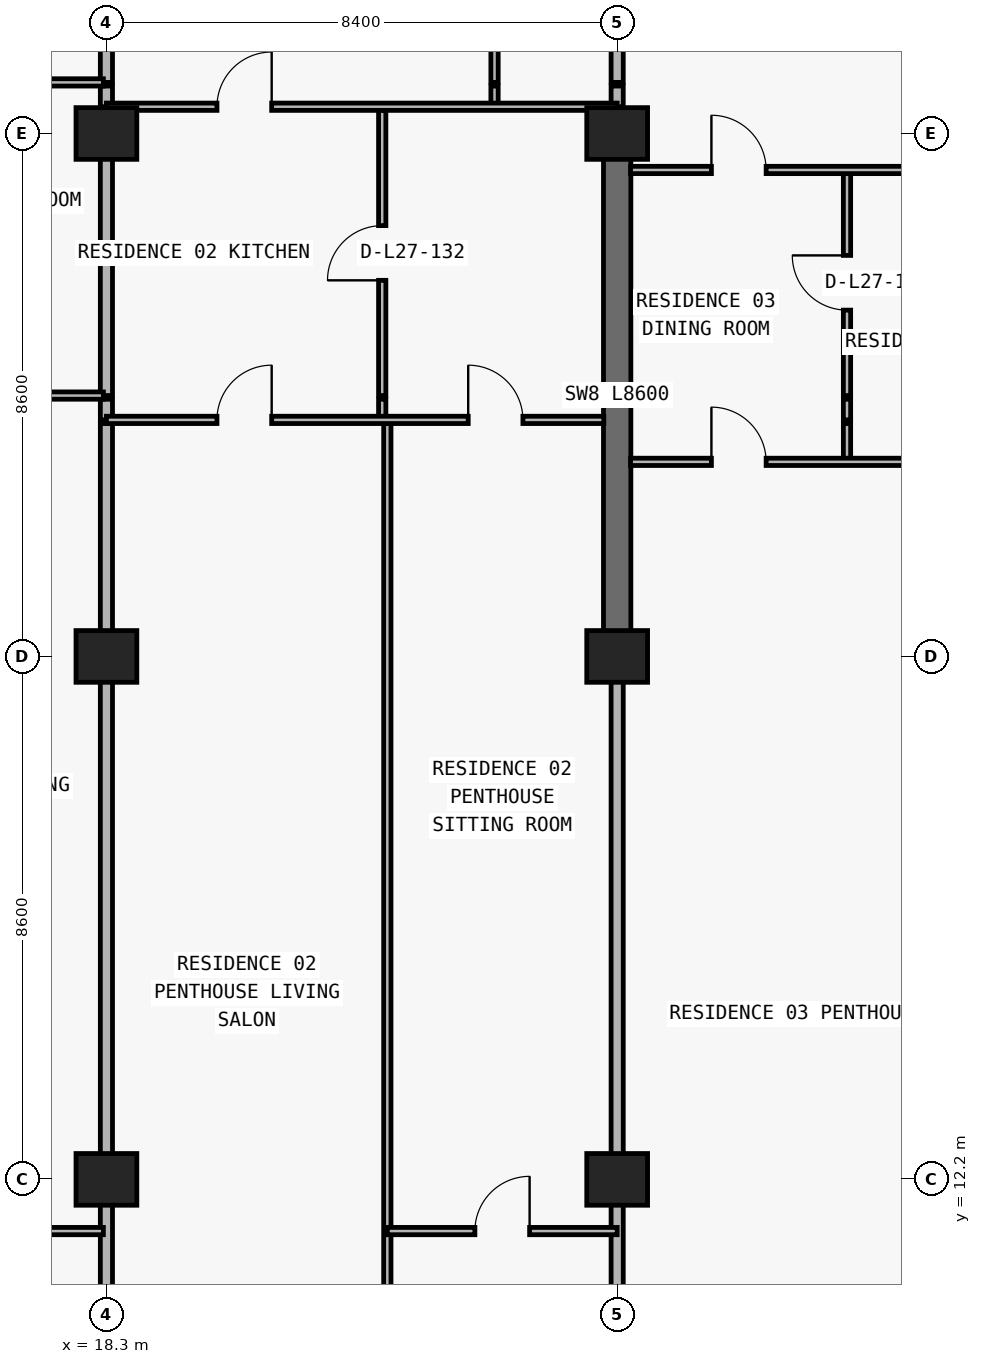
"""IFC4 building model, lengths in metres.
Left out: names, types, materials, properties, quantities, classifications, styles, units other than length and angle.
Written with IfcOpenShell. Run it as: python <this file> out.ifc"""

import sys

from ifc_helpers import new_model, si_unit, direction, frame, frame_2d, origin, origin_2d, place, context, subcontext, project, spatial, rectangle, extrude, element, fill, save


model = new_model("IFC4")
c1 = context("Model", 3, precision=1e-05, world=origin(), true_north=direction((0.0, 1.0)))
c2 = subcontext(c1, "Body", "Model", "MODEL_VIEW")
j1 = project(units=[si_unit("LENGTHUNIT", "METRE"), si_unit("PLANEANGLEUNIT", "RADIAN")], contexts=[c1])
p1 = place(None, origin())
s1 = spatial("IfcSite", under=j1, at=p1, CompositionType="ELEMENT")
p2 = place(p1, origin())
s2 = spatial("IfcBuilding", under=s1, at=p2, CompositionType="ELEMENT")
p3 = place(p2, frame((0.0, 0.0, 102.6)))
s3 = spatial("IfcBuildingStorey", under=s2, at=p3, CompositionType="ELEMENT", Elevation=102.6)
for number, where, z_axis, x_axis in (
    (1, (18.3, 12.2, 0.0), (0.0, 0.0, 1.0), (1.0, 0.0, 0.0)),
    (2, (26.7, 12.2, 0.0), (0.0, 0.0, 1.0), (1.0, 0.0, 0.0)),
    (3, (18.3, 20.8, 0.0), (0.0, 0.0, 1.0), (1.0, 0.0, 0.0)),
    (4, (26.7, 20.8, 0.0), (0.0, 0.0, 1.0), (1.0, 0.0, 0.0)),
    (5, (18.3, 29.4, 0.0), (0.0, 0.0, 1.0), (1.0, 0.0, 0.0)),
    (6, (26.7, 29.4, 0.0), (0.0, 0.0, 1.0), (1.0, 0.0, 0.0)),
):
    element("IfcColumn", number, at=place(p3, frame(where, z_axis=z_axis, x_axis=x_axis)), inside=s3, PredefinedType="COLUMN", context=c2, shape_type="SweptSolid", body=[
        extrude(rectangle(XDim=1.0, YDim=0.85, at=origin_2d()), origin(), (0.0, 0.0, 1.0), 3.05),
    ])
p4 = place(p3, frame((26.7, 20.8, 0.0), z_axis=(0.0, 0.0, 1.0), x_axis=(0.0, 1.0, 0.0)))
e7 = element("IfcWall", 7, at=p4, inside=s3, PredefinedType="SHEAR", context=c2, shape_type="SweptSolid", body=[
    extrude(rectangle(XDim=8.6, YDim=0.45, at=frame_2d((4.3, 0.0))), origin(), (0.0, 0.0, 1.0), 3.05),
])
p5 = place(p3, frame((18.3, 8.84, 0.0), z_axis=(0.0, 0.0, 1.0), x_axis=(0.0, 1.0, 0.0)))
e8 = element("IfcWall", 8, at=p5, inside=s3, PredefinedType="PARTITIONING", context=c2, shape_type="SweptSolid", body=[
    extrude(rectangle(XDim=15.79, YDim=0.2, at=frame_2d((7.895, 0.0))), origin(), (0.0, 0.0, 1.0), 2.174),
])
p6 = place(p3, frame((18.3, 24.69, 0.0), z_axis=(0.0, 0.0, 1.0), x_axis=(0.0, 1.0, 0.0)))
e9 = element("IfcWall", 9, at=p6, inside=s3, PredefinedType="PARTITIONING", context=c2, shape_type="SweptSolid", body=[
    extrude(rectangle(XDim=0.34, YDim=0.2, at=frame_2d((0.17, 0.0))), origin(), (0.0, 0.0, 1.0), 2.174),
])
p7 = place(p3, frame((18.3, 25.09, 0.0), z_axis=(0.0, 0.0, 1.0), x_axis=(0.0, 1.0, 0.0)))
e10 = element("IfcWall", 10, at=p7, inside=s3, PredefinedType="PARTITIONING", context=c2, shape_type="SweptSolid", body=[
    extrude(rectangle(XDim=4.69, YDim=0.2, at=frame_2d((2.345, 0.0))), origin(), (0.0, 0.0, 1.0), 2.174),
])
p8 = place(p3, frame((18.3, 29.84, 0.0), z_axis=(0.0, 0.0, 1.0), x_axis=(0.0, 1.0, 0.0)))
e11 = element("IfcWall", 11, at=p8, inside=s3, PredefinedType="PARTITIONING", context=c2, shape_type="SweptSolid", body=[
    extrude(rectangle(XDim=0.34, YDim=0.2, at=frame_2d((0.17, 0.0))), origin(), (0.0, 0.0, 1.0), 2.174),
])
p9 = place(p3, frame((18.3, 30.24, 0.0), z_axis=(0.0, 0.0, 1.0), x_axis=(0.0, 1.0, 0.0)))
e12 = element("IfcWall", 12, at=p9, inside=s3, PredefinedType="PARTITIONING", context=c2, shape_type="SweptSolid", body=[
    extrude(rectangle(XDim=4.36, YDim=0.2, at=frame_2d((2.18, 0.0))), origin(), (0.0, 0.0, 1.0), 2.174),
])
p10 = place(p3, frame((22.836, 24.69, 0.0), z_axis=(0.0, 0.0, 1.0), x_axis=(0.0, 1.0, 0.0)))
e13 = element("IfcWall", 13, at=p10, inside=s3, PredefinedType="PARTITIONING", context=c2, shape_type="SweptSolid", body=[
    extrude(rectangle(XDim=0.34, YDim=0.12, at=frame_2d((0.17, 0.0))), origin(), (0.0, 0.0, 1.0), 3.05),
])
p11 = place(p3, frame((22.836, 25.09, 0.0), z_axis=(0.0, 0.0, 1.0), x_axis=(0.0, 1.0, 0.0)))
e14 = element("IfcWall", 14, at=p11, inside=s3, PredefinedType="PARTITIONING", context=c2, shape_type="SweptSolid", body=[
    extrude(rectangle(XDim=4.69, YDim=0.12, at=frame_2d((2.345, 0.0))), origin(), (0.0, 0.0, 1.0), 3.05),
])
p12 = place(p11, frame((1.895, 0.0, 0.0)))
e15 = element("IfcOpeningElement", 15, at=p12, cuts=e14, PredefinedType="OPENING", context=c2, shape_type="SweptSolid", body=[
    extrude(rectangle(XDim=0.9, YDim=2.15, at=frame_2d((0.45, 1.075))), frame((0.0, 0.07, 0.0), z_axis=(0.0, -1.0, 0.0), x_axis=(1.0, 0.0, 0.0)), (0.0, 0.0, 1.0), 0.14),
])
p13 = place(p3, frame((22.92, 8.84, 0.0), z_axis=(0.0, 0.0, 1.0), x_axis=(0.0, 1.0, 0.0)))
e16 = element("IfcWall", 16, at=p13, inside=s3, PredefinedType="PARTITIONING", context=c2, shape_type="SweptSolid", body=[
    extrude(rectangle(XDim=15.79, YDim=0.12, at=frame_2d((7.895, 0.0))), origin(), (0.0, 0.0, 1.0), 3.05),
])
p14 = place(p3, frame((24.683, 29.84, 0.0), z_axis=(0.0, 0.0, 1.0), x_axis=(0.0, 1.0, 0.0)))
e17 = element("IfcWall", 17, at=p14, inside=s3, PredefinedType="PARTITIONING", context=c2, shape_type="SweptSolid", body=[
    extrude(rectangle(XDim=0.34, YDim=0.12, at=frame_2d((0.17, 0.0))), origin(), (0.0, 0.0, 1.0), 3.05),
])
p15 = place(p3, frame((24.683, 30.24, 0.0), z_axis=(0.0, 0.0, 1.0), x_axis=(0.0, 1.0, 0.0)))
e18 = element("IfcWall", 18, at=p15, inside=s3, PredefinedType="PARTITIONING", context=c2, shape_type="SweptSolid", body=[
    extrude(rectangle(XDim=4.36, YDim=0.12, at=frame_2d((2.18, 0.0))), origin(), (0.0, 0.0, 1.0), 3.05),
])
p16 = place(p15, frame((1.755, 0.0, 0.0)))
e19 = element("IfcOpeningElement", 19, at=p16, cuts=e18, PredefinedType="OPENING", context=c2, shape_type="SweptSolid", body=[
    extrude(rectangle(XDim=0.85, YDim=2.1, at=frame_2d((0.425, 1.05))), frame((0.0, 0.07, 0.0), z_axis=(0.0, -1.0, 0.0), x_axis=(1.0, 0.0, 0.0)), (0.0, 0.0, 1.0), 0.14),
])
p17 = place(p3, frame((26.7, 8.84, 0.0), z_axis=(0.0, 0.0, 1.0), x_axis=(0.0, 1.0, 0.0)))
e20 = element("IfcWall", 20, at=p17, inside=s3, PredefinedType="PARTITIONING", context=c2, shape_type="SweptSolid", body=[
    extrude(rectangle(XDim=11.955, YDim=0.2, at=frame_2d((5.978, 0.0))), origin(), (0.0, 0.0, 1.0), 2.174),
])
p18 = place(p3, frame((26.7, 29.405, 0.0), z_axis=(0.0, 0.0, 1.0), x_axis=(0.0, 1.0, 0.0)))
e21 = element("IfcWall", 21, at=p18, inside=s3, PredefinedType="PARTITIONING", context=c2, shape_type="SweptSolid", body=[
    extrude(rectangle(XDim=0.375, YDim=0.2, at=frame_2d((0.188, 0.0))), origin(), (0.0, 0.0, 1.0), 3.05),
])
p19 = place(p3, frame((26.7, 29.84, 0.0), z_axis=(0.0, 0.0, 1.0), x_axis=(0.0, 1.0, 0.0)))
e22 = element("IfcWall", 22, at=p19, inside=s3, PredefinedType="PARTITIONING", context=c2, shape_type="SweptSolid", body=[
    extrude(rectangle(XDim=0.34, YDim=0.2, at=frame_2d((0.17, 0.0))), origin(), (0.0, 0.0, 1.0), 2.335),
])
p20 = place(p3, frame((26.7, 30.24, 0.0), z_axis=(0.0, 0.0, 1.0), x_axis=(0.0, 1.0, 0.0)))
e23 = element("IfcWall", 23, at=p20, inside=s3, PredefinedType="PARTITIONING", context=c2, shape_type="SweptSolid", body=[
    extrude(rectangle(XDim=4.36, YDim=0.2, at=frame_2d((2.18, 0.0))), origin(), (0.0, 0.0, 1.0), 2.335),
])
p21 = place(p3, frame((30.48, 24.0, 0.0), z_axis=(0.0, 0.0, 1.0), x_axis=(0.0, 1.0, 0.0)))
e24 = element("IfcWall", 24, at=p21, inside=s3, PredefinedType="PARTITIONING", context=c2, shape_type="SweptSolid", body=[
    extrude(rectangle(XDim=0.63, YDim=0.12, at=frame_2d((0.315, 0.0))), origin(), (0.0, 0.0, 1.0), 3.05),
])
p22 = place(p3, frame((30.48, 24.69, 0.0), z_axis=(0.0, 0.0, 1.0), x_axis=(0.0, 1.0, 0.0)))
e25 = element("IfcWall", 25, at=p22, inside=s3, PredefinedType="PARTITIONING", context=c2, shape_type="SweptSolid", body=[
    extrude(rectangle(XDim=0.34, YDim=0.12, at=frame_2d((0.17, 0.0))), origin(), (0.0, 0.0, 1.0), 3.05),
])
p23 = place(p3, frame((30.48, 25.09, 0.0), z_axis=(0.0, 0.0, 1.0), x_axis=(0.0, 1.0, 0.0)))
e26 = element("IfcWall", 26, at=p23, inside=s3, PredefinedType="PARTITIONING", context=c2, shape_type="SweptSolid", body=[
    extrude(rectangle(XDim=3.71, YDim=0.12, at=frame_2d((1.855, 0.0))), origin(), (0.0, 0.0, 1.0), 3.05),
])
p24 = place(p23, frame((1.405, 0.0, 0.0)))
e27 = element("IfcOpeningElement", 27, at=p24, cuts=e26, PredefinedType="OPENING", context=c2, shape_type="SweptSolid", body=[
    extrude(rectangle(XDim=0.9, YDim=2.15, at=frame_2d((0.45, 1.075))), frame((0.0, 0.07, 0.0), z_axis=(0.0, -1.0, 0.0), x_axis=(1.0, 0.0, 0.0)), (0.0, 0.0, 1.0), 0.14),
])
p25 = place(p3, frame((13.848, 11.35, 0.0), z_axis=(0.0, 0.0, 1.0), x_axis=(1.0, 0.0, 0.0)))
e28 = element("IfcWall", 28, at=p25, inside=s3, PredefinedType="PARTITIONING", context=c2, shape_type="SweptSolid", body=[
    extrude(rectangle(XDim=4.402, YDim=0.12, at=frame_2d((2.201, 0.0))), origin(), (0.0, 0.0, 1.0), 3.05),
])
p26 = place(p25, frame((1.751, 0.0, 0.0)))
e29 = element("IfcOpeningElement", 29, at=p26, cuts=e28, PredefinedType="OPENING", context=c2, shape_type="SweptSolid", body=[
    extrude(rectangle(XDim=0.9, YDim=2.15, at=frame_2d((0.45, 1.075))), frame((0.0, 0.07, 0.0), z_axis=(0.0, -1.0, 0.0), x_axis=(1.0, 0.0, 0.0)), (0.0, 0.0, 1.0), 0.14),
])
p27 = place(p3, frame((22.92, 11.35, 0.0), z_axis=(0.0, 0.0, 1.0), x_axis=(1.0, 0.0, 0.0)))
e30 = element("IfcWall", 30, at=p27, inside=s3, PredefinedType="PARTITIONING", context=c2, shape_type="SweptSolid", body=[
    extrude(rectangle(XDim=3.78, YDim=0.12, at=frame_2d((1.89, 0.0))), origin(), (0.0, 0.0, 1.0), 3.05),
])
p28 = place(p27, frame((1.44, 0.0, 0.0)))
e31 = element("IfcOpeningElement", 31, at=p28, cuts=e30, PredefinedType="OPENING", context=c2, shape_type="SweptSolid", body=[
    extrude(rectangle(XDim=0.9, YDim=2.15, at=frame_2d((0.45, 1.075))), frame((0.0, 0.07, 0.0), z_axis=(0.0, -1.0, 0.0), x_axis=(1.0, 0.0, 0.0)), (0.0, 0.0, 1.0), 0.14),
])
p29 = place(p3, frame((26.92, 24.0, 0.0), z_axis=(0.0, 0.0, 1.0), x_axis=(1.0, 0.0, 0.0)))
e32 = element("IfcWall", 32, at=p29, inside=s3, PredefinedType="PARTITIONING", context=c2, shape_type="SweptSolid", body=[
    extrude(rectangle(XDim=8.18, YDim=0.12, at=frame_2d((4.09, 0.0))), origin(), (0.0, 0.0, 1.0), 3.05),
])
p30 = place(p29, frame((1.33, 0.0, 0.0)))
e33 = element("IfcOpeningElement", 33, at=p30, cuts=e32, PredefinedType="OPENING", context=c2, shape_type="SweptSolid", body=[
    extrude(rectangle(XDim=0.9, YDim=2.15, at=frame_2d((0.45, 1.075))), frame((0.0, 0.07, 0.0), z_axis=(0.0, -1.0, 0.0), x_axis=(1.0, 0.0, 0.0)), (0.0, 0.0, 1.0), 0.14),
])
p31 = place(p3, frame((18.3, 24.69, 0.0), z_axis=(0.0, 0.0, 1.0), x_axis=(1.0, 0.0, 0.0)))
e34 = element("IfcWall", 34, at=p31, inside=s3, PredefinedType="PARTITIONING", context=c2, shape_type="SweptSolid", body=[
    extrude(rectangle(XDim=8.18, YDim=0.12, at=frame_2d((4.09, 0.0))), origin(), (0.0, 0.0, 1.0), 3.05),
])
p32 = place(p31, frame((1.818, 0.0, 0.0)))
e35 = element("IfcOpeningElement", 35, at=p32, cuts=e34, PredefinedType="OPENING", context=c2, shape_type="SweptSolid", body=[
    extrude(rectangle(XDim=0.9, YDim=2.15, at=frame_2d((0.45, 1.075))), frame((0.0, 0.07, 0.0), z_axis=(0.0, -1.0, 0.0), x_axis=(1.0, 0.0, 0.0)), (0.0, 0.0, 1.0), 0.14),
])
p33 = place(p31, frame((5.95, 0.0, 0.0)))
e36 = element("IfcOpeningElement", 36, at=p33, cuts=e34, PredefinedType="OPENING", context=c2, shape_type="SweptSolid", body=[
    extrude(rectangle(XDim=0.9, YDim=2.15, at=frame_2d((0.45, 1.075))), frame((0.0, 0.07, 0.0), z_axis=(0.0, -1.0, 0.0), x_axis=(1.0, 0.0, 0.0)), (0.0, 0.0, 1.0), 0.14),
])
p34 = place(p3, frame((9.9, 25.09, 0.0), z_axis=(0.0, 0.0, 1.0), x_axis=(1.0, 0.0, 0.0)))
e37 = element("IfcWall", 37, at=p34, inside=s3, PredefinedType="PARTITIONING", context=c2, shape_type="SweptSolid", body=[
    extrude(rectangle(XDim=8.35, YDim=0.12, at=frame_2d((4.175, 0.0))), origin(), (0.0, 0.0, 1.0), 3.05),
])
p35 = place(p34, frame((1.524, 0.0, 0.0)))
e38 = element("IfcOpeningElement", 38, at=p35, cuts=e37, PredefinedType="OPENING", context=c2, shape_type="SweptSolid", body=[
    extrude(rectangle(XDim=0.9, YDim=2.15, at=frame_2d((0.45, 1.075))), frame((0.0, 0.07, 0.0), z_axis=(0.0, -1.0, 0.0), x_axis=(1.0, 0.0, 0.0)), (0.0, 0.0, 1.0), 0.14),
])
p36 = place(p34, frame((5.868, 0.0, 0.0)))
e39 = element("IfcOpeningElement", 39, at=p36, cuts=e37, PredefinedType="OPENING", context=c2, shape_type="SweptSolid", body=[
    extrude(rectangle(XDim=0.9, YDim=2.15, at=frame_2d((0.45, 1.075))), frame((0.0, 0.07, 0.0), z_axis=(0.0, -1.0, 0.0), x_axis=(1.0, 0.0, 0.0)), (0.0, 0.0, 1.0), 0.14),
])
p37 = place(p3, frame((26.92, 28.8, 0.0), z_axis=(0.0, 0.0, 1.0), x_axis=(1.0, 0.0, 0.0)))
e40 = element("IfcWall", 40, at=p37, inside=s3, PredefinedType="PARTITIONING", context=c2, shape_type="SweptSolid", body=[
    extrude(rectangle(XDim=8.175, YDim=0.12, at=frame_2d((4.087, 0.0))), origin(), (0.0, 0.0, 1.0), 3.05),
])
p38 = place(p37, frame((1.33, 0.0, 0.0)))
e41 = element("IfcOpeningElement", 41, at=p38, cuts=e40, PredefinedType="OPENING", context=c2, shape_type="SweptSolid", body=[
    extrude(rectangle(XDim=0.9, YDim=2.15, at=frame_2d((0.45, 1.075))), frame((0.0, 0.07, 0.0), z_axis=(0.0, -1.0, 0.0), x_axis=(1.0, 0.0, 0.0)), (0.0, 0.0, 1.0), 0.14),
])
p39 = place(p3, frame((18.3, 29.84, 0.0), z_axis=(0.0, 0.0, 1.0), x_axis=(1.0, 0.0, 0.0)))
e42 = element("IfcWall", 42, at=p39, inside=s3, PredefinedType="PARTITIONING", context=c2, shape_type="SweptSolid", body=[
    extrude(rectangle(XDim=8.4, YDim=0.12, at=frame_2d((4.2, 0.0))), origin(), (0.0, 0.0, 1.0), 3.05),
])
p40 = place(p39, frame((1.818, 0.0, 0.0)))
e43 = element("IfcOpeningElement", 43, at=p40, cuts=e42, PredefinedType="OPENING", context=c2, shape_type="SweptSolid", body=[
    extrude(rectangle(XDim=0.9, YDim=2.15, at=frame_2d((0.45, 1.075))), frame((0.0, 0.07, 0.0), z_axis=(0.0, -1.0, 0.0), x_axis=(1.0, 0.0, 0.0)), (0.0, 0.0, 1.0), 0.14),
])
p41 = place(p3, frame((9.9, 30.24, 0.0), z_axis=(0.0, 0.0, 1.0), x_axis=(1.0, 0.0, 0.0)))
e44 = element("IfcWall", 44, at=p41, inside=s3, PredefinedType="PARTITIONING", context=c2, shape_type="SweptSolid", body=[
    extrude(rectangle(XDim=8.35, YDim=0.12, at=frame_2d((4.175, 0.0))), origin(), (0.0, 0.0, 1.0), 3.05),
])
p42 = place(p41, frame((1.693, 0.0, 0.0)))
e45 = element("IfcOpeningElement", 45, at=p42, cuts=e44, PredefinedType="OPENING", context=c2, shape_type="SweptSolid", body=[
    extrude(rectangle(XDim=0.9, YDim=2.15, at=frame_2d((0.45, 1.075))), frame((0.0, 0.07, 0.0), z_axis=(0.0, -1.0, 0.0), x_axis=(1.0, 0.0, 0.0)), (0.0, 0.0, 1.0), 0.14),
])
p43 = place(p40, origin())
e46 = element("IfcDoor", 46, at=p43, inside=s3, OperationType="SINGLE_SWING_RIGHT", PredefinedType="DOOR", context=c2, shape_type="SweptSolid", body=[
    extrude(rectangle(XDim=0.9, YDim=2.15, at=frame_2d((0.45, 1.075))), frame((0.0, 0.025, 0.0), z_axis=(0.0, -1.0, 0.0), x_axis=(1.0, 0.0, 0.0)), (0.0, 0.0, 1.0), 0.05),
])
fill(e43, e46)
p44 = place(p12, origin())
e47 = element("IfcDoor", 47, at=p44, inside=s3, OperationType="SINGLE_SWING_LEFT", PredefinedType="DOOR", context=c2, shape_type="SweptSolid", body=[
    extrude(rectangle(XDim=0.9, YDim=2.15, at=frame_2d((0.45, 1.075))), frame((0.0, 0.025, 0.0), z_axis=(0.0, -1.0, 0.0), x_axis=(1.0, 0.0, 0.0)), (0.0, 0.0, 1.0), 0.05),
])
fill(e15, e47)
p45 = place(p32, origin())
e48 = element("IfcDoor", 48, at=p45, inside=s3, OperationType="SINGLE_SWING_RIGHT", PredefinedType="DOOR", context=c2, shape_type="SweptSolid", body=[
    extrude(rectangle(XDim=0.9, YDim=2.15, at=frame_2d((0.45, 1.075))), frame((0.0, 0.025, 0.0), z_axis=(0.0, -1.0, 0.0), x_axis=(1.0, 0.0, 0.0)), (0.0, 0.0, 1.0), 0.05),
])
fill(e35, e48)
p46 = place(p33, origin())
e49 = element("IfcDoor", 49, at=p46, inside=s3, OperationType="SINGLE_SWING_LEFT", PredefinedType="DOOR", context=c2, shape_type="SweptSolid", body=[
    extrude(rectangle(XDim=0.9, YDim=2.15, at=frame_2d((0.45, 1.075))), frame((0.0, 0.025, 0.0), z_axis=(0.0, -1.0, 0.0), x_axis=(1.0, 0.0, 0.0)), (0.0, 0.0, 1.0), 0.05),
])
fill(e36, e49)
p47 = place(p28, origin())
e50 = element("IfcDoor", 50, at=p47, inside=s3, OperationType="SINGLE_SWING_RIGHT", PredefinedType="DOOR", context=c2, shape_type="SweptSolid", body=[
    extrude(rectangle(XDim=0.9, YDim=2.15, at=frame_2d((0.45, 1.075))), frame((0.0, 0.025, 0.0), z_axis=(0.0, -1.0, 0.0), x_axis=(1.0, 0.0, 0.0)), (0.0, 0.0, 1.0), 0.05),
])
fill(e31, e50)
p48 = place(p38, origin())
e51 = element("IfcDoor", 51, at=p48, inside=s3, OperationType="SINGLE_SWING_LEFT", PredefinedType="DOOR", context=c2, shape_type="SweptSolid", body=[
    extrude(rectangle(XDim=0.9, YDim=2.15, at=frame_2d((0.45, 1.075))), frame((0.0, 0.025, 0.0), z_axis=(0.0, -1.0, 0.0), x_axis=(1.0, 0.0, 0.0)), (0.0, 0.0, 1.0), 0.05),
])
fill(e41, e51)
p49 = place(p24, origin())
e52 = element("IfcDoor", 52, at=p49, inside=s3, OperationType="SINGLE_SWING_RIGHT", PredefinedType="DOOR", context=c2, shape_type="SweptSolid", body=[
    extrude(rectangle(XDim=0.9, YDim=2.15, at=frame_2d((0.45, 1.075))), frame((0.0, 0.025, 0.0), z_axis=(0.0, -1.0, 0.0), x_axis=(1.0, 0.0, 0.0)), (0.0, 0.0, 1.0), 0.05),
])
fill(e27, e52)
p50 = place(p30, origin())
e53 = element("IfcDoor", 53, at=p50, inside=s3, OperationType="SINGLE_SWING_LEFT", PredefinedType="DOOR", context=c2, shape_type="SweptSolid", body=[
    extrude(rectangle(XDim=0.9, YDim=2.15, at=frame_2d((0.45, 1.075))), frame((0.0, 0.025, 0.0), z_axis=(0.0, -1.0, 0.0), x_axis=(1.0, 0.0, 0.0)), (0.0, 0.0, 1.0), 0.05),
])
fill(e33, e53)
save(model, sys.argv[1])
